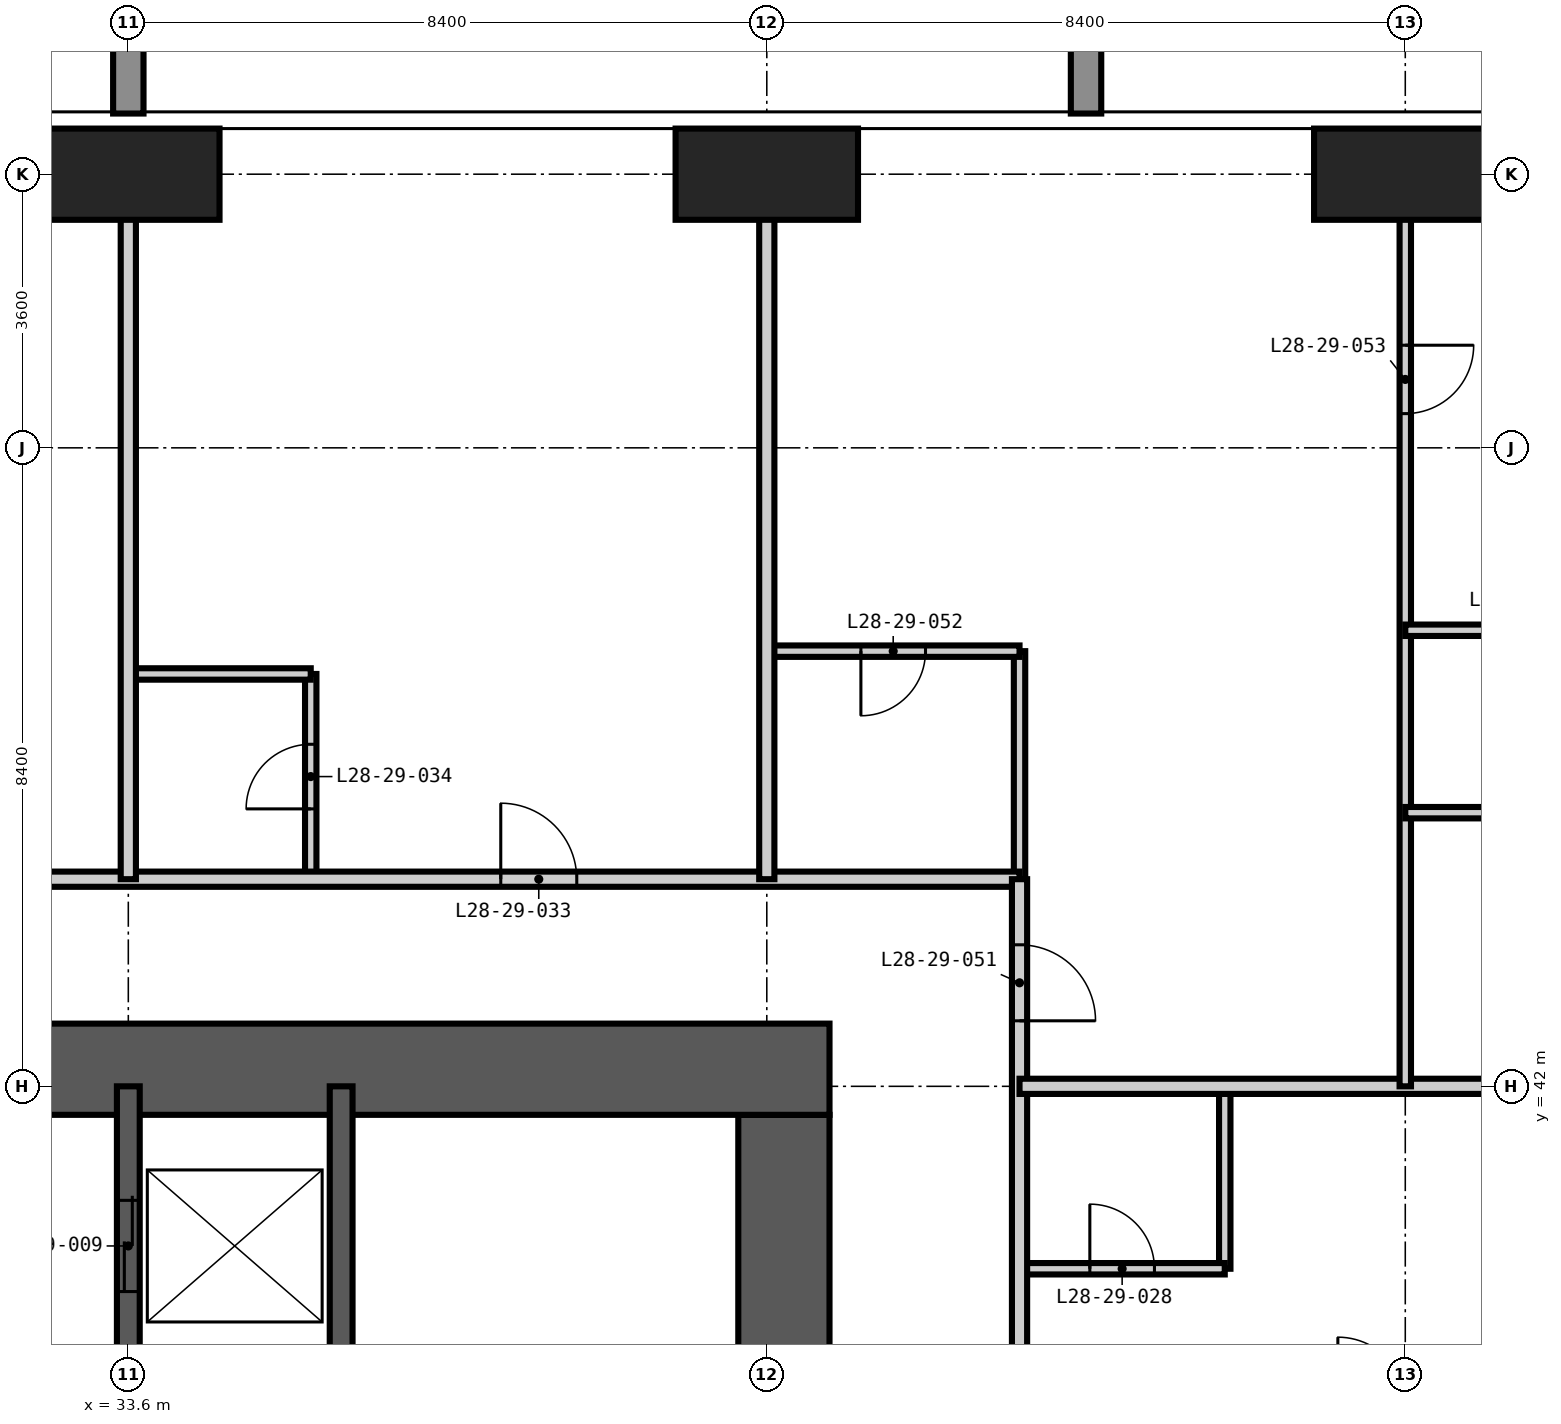
"""IFC4 building model, lengths in metres.
Left out: names, types, materials, properties, quantities, classifications, styles, units other than length and angle.
Written with IfcOpenShell. Run it as: python <this file> out.ifc"""

import sys

from ifc_helpers import new_model, si_unit, direction, frame, frame_2d, origin, origin_2d, place, context, subcontext, project, spatial, rectangle, extrude, element, fill, save


model = new_model("IFC4")
c1 = context("Model", 3, precision=1e-05, world=origin(), true_north=direction((0.0, 1.0)))
c2 = subcontext(c1, "Body", "Model", "MODEL_VIEW")
j1 = project(units=[si_unit("LENGTHUNIT", "METRE"), si_unit("PLANEANGLEUNIT", "RADIAN")], contexts=[c1])
p1 = place(None, origin())
s1 = spatial("IfcSite", under=j1, at=p1, CompositionType="ELEMENT")
p2 = place(p1, origin())
s2 = spatial("IfcBuilding", under=s1, at=p2, CompositionType="ELEMENT")
p3 = place(p2, frame((0.0, 0.0, 111.6)))
s3 = spatial("IfcBuildingStorey", under=s2, at=p3, CompositionType="ELEMENT", Elevation=111.6)
for number, where, z_axis, x_axis in (
    (1, (33.6, 54.0, -0.35), (0.0, 0.0, 1.0), (1.0, 0.0, 0.0)),
    (2, (42.0, 54.0, -0.35), (0.0, 0.0, 1.0), (1.0, 0.0, 0.0)),
    (3, (50.4, 54.0, -0.35), (0.0, 0.0, 1.0), (1.0, 0.0, 0.0)),
):
    element("IfcColumn", number, at=place(p3, frame(where, z_axis=z_axis, x_axis=x_axis)), inside=s3, PredefinedType="COLUMN", context=c2, shape_type="SweptSolid", body=[
        extrude(rectangle(XDim=2.4, YDim=1.2, at=origin_2d()), origin(), (0.0, 0.0, 1.0), 3.6),
    ])
p4 = place(p3, frame((42.225, 17.175, -0.35), z_axis=(0.0, 0.0, 1.0), x_axis=(0.0, 1.0, 0.0)))
e4 = element("IfcWall", 4, at=p4, inside=s3, PredefinedType="SHEAR", context=c2, shape_type="SweptSolid", body=[
    extrude(rectangle(XDim=24.45, YDim=1.2, at=frame_2d((12.225, 0.0))), origin(), (0.0, 0.0, 1.0), 3.6),
])
p5 = place(p4, frame((0.425, 0.0, 0.35)))
e5 = element("IfcOpeningElement", 5, at=p5, cuts=e4, PredefinedType="OPENING", context=c2, shape_type="SweptSolid", body=[
    extrude(rectangle(XDim=1.2, YDim=2.2, at=frame_2d((0.6, 1.1))), frame((0.0, 0.61, 0.0), z_axis=(0.0, -1.0, 0.0), x_axis=(1.0, 0.0, 0.0)), (0.0, 0.0, 1.0), 1.22),
])
p6 = place(p4, frame((11.325, 0.0, 0.35)))
e6 = element("IfcOpeningElement", 6, at=p6, cuts=e4, PredefinedType="OPENING", context=c2, shape_type="SweptSolid", body=[
    extrude(rectangle(XDim=1.8, YDim=2.2, at=frame_2d((0.9, 1.1))), frame((0.0, 0.61, 0.0), z_axis=(0.0, -1.0, 0.0), x_axis=(1.0, 0.0, 0.0)), (0.0, 0.0, 1.0), 1.22),
])
p7 = place(p4, frame((20.125, 0.0, 0.35)))
e7 = element("IfcOpeningElement", 7, at=p7, cuts=e4, PredefinedType="OPENING", context=c2, shape_type="SweptSolid", body=[
    extrude(rectangle(XDim=1.0, YDim=2.1, at=frame_2d((0.5, 1.05))), frame((0.0, 0.61, 0.0), z_axis=(0.0, -1.0, 0.0), x_axis=(1.0, 0.0, 0.0)), (0.0, 0.0, 1.0), 1.22),
])
p8 = place(p3, frame((42.825, 42.225, -0.35), z_axis=(0.0, 0.0, 1.0), x_axis=(-1.0, 0.0, 0.0)))
e8 = element("IfcWall", 8, at=p8, inside=s3, PredefinedType="SHEAR", context=c2, shape_type="SweptSolid", body=[
    extrude(rectangle(XDim=26.85, YDim=1.2, at=frame_2d((13.425, 0.0))), origin(), (0.0, 0.0, 1.0), 3.6),
])
p9 = place(p8, frame((21.325, 0.0, 0.35)))
e9 = element("IfcOpeningElement", 9, at=p9, cuts=e8, PredefinedType="OPENING", context=c2, shape_type="SweptSolid", body=[
    extrude(rectangle(XDim=1.0, YDim=2.1, at=frame_2d((0.5, 1.05))), frame((0.0, 0.61, 0.0), z_axis=(0.0, -1.0, 0.0), x_axis=(1.0, 0.0, 0.0)), (0.0, 0.0, 1.0), 1.22),
])
p10 = place(p8, frame((10.725, 0.0, 0.35)))
e10 = element("IfcOpeningElement", 10, at=p10, cuts=e8, PredefinedType="OPENING", context=c2, shape_type="SweptSolid", body=[
    extrude(rectangle(XDim=1.2, YDim=2.2, at=frame_2d((0.6, 1.1))), frame((0.0, 0.61, 0.0), z_axis=(0.0, -1.0, 0.0), x_axis=(1.0, 0.0, 0.0)), (0.0, 0.0, 1.0), 1.22),
])
p11 = place(p3, frame((33.6, 16.8, -0.35), z_axis=(0.0, 0.0, 1.0), x_axis=(0.0, 1.0, 0.0)))
e11 = element("IfcWall", 11, at=p11, inside=s3, PredefinedType="SHEAR", context=c2, shape_type="SweptSolid", body=[
    extrude(rectangle(XDim=25.2, YDim=0.3, at=frame_2d((12.6, 0.0))), origin(), (0.0, 0.0, 1.0), 3.6),
])
p12 = place(p11, frame((22.5, 0.0, 0.35)))
e12 = element("IfcOpeningElement", 12, at=p12, cuts=e11, PredefinedType="OPENING", context=c2, shape_type="SweptSolid", body=[
    extrude(rectangle(XDim=1.2, YDim=2.2, at=frame_2d((0.6, 1.1))), frame((0.0, 0.16, 0.0), z_axis=(0.0, -1.0, 0.0), x_axis=(1.0, 0.0, 0.0)), (0.0, 0.0, 1.0), 0.32),
])
p13 = place(p11, frame((18.3, 0.0, 0.35)))
e13 = element("IfcOpeningElement", 13, at=p13, cuts=e11, PredefinedType="OPENING", context=c2, shape_type="SweptSolid", body=[
    extrude(rectangle(XDim=1.2, YDim=2.2, at=frame_2d((0.6, 1.1))), frame((0.0, 0.16, 0.0), z_axis=(0.0, -1.0, 0.0), x_axis=(1.0, 0.0, 0.0)), (0.0, 0.0, 1.0), 0.32),
])
p14 = place(p3, frame((36.4, 33.6, -0.35), z_axis=(0.0, 0.0, 1.0), x_axis=(0.0, 1.0, 0.0)))
e14 = element("IfcWall", 14, at=p14, inside=s3, PredefinedType="SHEAR", context=c2, shape_type="SweptSolid", body=[
    extrude(rectangle(XDim=8.4, YDim=0.3, at=frame_2d((4.2, 0.0))), origin(), (0.0, 0.0, 1.0), 3.6),
])
p15 = place(p3, frame((36.0, 44.725, 0.0), z_axis=(0.0, 0.0, 1.0), x_axis=(0.0, 1.0, 0.0)))
e15 = element("IfcWall", 15, at=p15, inside=s3, PredefinedType="PARTITIONING", context=c2, shape_type="SweptSolid", body=[
    extrude(rectangle(XDim=2.7, YDim=0.15, at=frame_2d((1.35, 0.0))), origin(), (0.0, 0.0, 1.0), 3.25),
])
p16 = place(p15, frame((0.925, 0.0, 0.0)))
e16 = element("IfcOpeningElement", 16, at=p16, cuts=e15, PredefinedType="OPENING", context=c2, shape_type="SweptSolid", body=[
    extrude(rectangle(XDim=0.85, YDim=2.1, at=frame_2d((0.425, 1.05))), frame((0.0, 0.085, 0.0), z_axis=(0.0, -1.0, 0.0), x_axis=(1.0, 0.0, 0.0)), (0.0, 0.0, 1.0), 0.17),
])
p17 = place(p3, frame((45.325, 44.725, 0.0), z_axis=(0.0, 0.0, 1.0), x_axis=(0.0, 1.0, 0.0)))
e17 = element("IfcWall", 17, at=p17, inside=s3, PredefinedType="PARTITIONING", context=c2, shape_type="SweptSolid", body=[
    extrude(rectangle(XDim=3.0, YDim=0.15, at=frame_2d((1.5, 0.0))), origin(), (0.0, 0.0, 1.0), 3.25),
])
p18 = place(p3, frame((48.025, 39.6, 0.0), z_axis=(0.0, 0.0, 1.0), x_axis=(0.0, 1.0, 0.0)))
e18 = element("IfcWall", 18, at=p18, inside=s3, PredefinedType="PARTITIONING", context=c2, shape_type="SweptSolid", body=[
    extrude(rectangle(XDim=2.4, YDim=0.15, at=frame_2d((1.2, 0.0))), origin(), (0.0, 0.0, 1.0), 3.25),
])
p19 = place(p3, frame((45.325, 39.6, 0.0), z_axis=(0.0, 0.0, 1.0), x_axis=(1.0, 0.0, 0.0)))
e19 = element("IfcWall", 19, at=p19, inside=s3, PredefinedType="PARTITIONING", context=c2, shape_type="SweptSolid", body=[
    extrude(rectangle(XDim=2.7, YDim=0.15, at=frame_2d((1.35, 0.0))), origin(), (0.0, 0.0, 1.0), 3.25),
])
p20 = place(p19, frame((0.925, 0.0, 0.0)))
e20 = element("IfcOpeningElement", 20, at=p20, cuts=e19, PredefinedType="OPENING", context=c2, shape_type="SweptSolid", body=[
    extrude(rectangle(XDim=0.85, YDim=2.1, at=frame_2d((0.425, 1.05))), frame((0.0, 0.085, 0.0), z_axis=(0.0, -1.0, 0.0), x_axis=(1.0, 0.0, 0.0)), (0.0, 0.0, 1.0), 0.17),
])
p21 = place(p3, frame((33.6, 47.425, 0.0), z_axis=(0.0, 0.0, 1.0), x_axis=(1.0, 0.0, 0.0)))
e21 = element("IfcWall", 21, at=p21, inside=s3, PredefinedType="PARTITIONING", context=c2, shape_type="SweptSolid", body=[
    extrude(rectangle(XDim=2.4, YDim=0.15, at=frame_2d((1.2, 0.0))), origin(), (0.0, 0.0, 1.0), 3.25),
])
p22 = place(p3, frame((42.0, 47.725, 0.0), z_axis=(0.0, 0.0, 1.0), x_axis=(1.0, 0.0, 0.0)))
e22 = element("IfcWall", 22, at=p22, inside=s3, PredefinedType="PARTITIONING", context=c2, shape_type="SweptSolid", body=[
    extrude(rectangle(XDim=3.325, YDim=0.15, at=frame_2d((1.663, 0.0))), origin(), (0.0, 0.0, 1.0), 3.25),
])
p23 = place(p22, frame((1.238, 0.0, 0.0)))
e23 = element("IfcOpeningElement", 23, at=p23, cuts=e22, PredefinedType="OPENING", context=c2, shape_type="SweptSolid", body=[
    extrude(rectangle(XDim=0.85, YDim=2.1, at=frame_2d((0.425, 1.05))), frame((0.0, 0.085, 0.0), z_axis=(0.0, -1.0, 0.0), x_axis=(1.0, 0.0, 0.0)), (0.0, 0.0, 1.0), 0.17),
])
p24 = place(p3, frame((12.6, 44.725, 0.0), z_axis=(0.0, 0.0, 1.0), x_axis=(1.0, 0.0, 0.0)))
e24 = element("IfcWall", 24, at=p24, inside=s3, PredefinedType="PARTITIONING", context=c2, shape_type="SweptSolid", body=[
    extrude(rectangle(XDim=32.725, YDim=0.2, at=frame_2d((16.362, 0.0))), origin(), (0.0, 0.0, 1.0), 3.25),
])
p25 = place(p24, frame((9.1, 0.0, 0.0)))
e25 = element("IfcOpeningElement", 25, at=p25, cuts=e24, PredefinedType="OPENING", context=c2, shape_type="SweptSolid", body=[
    extrude(rectangle(XDim=1.0, YDim=2.2, at=frame_2d((0.5, 1.1))), frame((0.0, 0.11, 0.0), z_axis=(0.0, -1.0, 0.0), x_axis=(1.0, 0.0, 0.0)), (0.0, 0.0, 1.0), 0.22),
])
p26 = place(p24, frame((17.5, 0.0, 0.0)))
e26 = element("IfcOpeningElement", 26, at=p26, cuts=e24, PredefinedType="OPENING", context=c2, shape_type="SweptSolid", body=[
    extrude(rectangle(XDim=1.0, YDim=2.2, at=frame_2d((0.5, 1.1))), frame((0.0, 0.11, 0.0), z_axis=(0.0, -1.0, 0.0), x_axis=(1.0, 0.0, 0.0)), (0.0, 0.0, 1.0), 0.22),
])
p27 = place(p24, frame((25.9, 0.0, 0.0)))
e27 = element("IfcOpeningElement", 27, at=p27, cuts=e24, PredefinedType="OPENING", context=c2, shape_type="SweptSolid", body=[
    extrude(rectangle(XDim=1.0, YDim=2.2, at=frame_2d((0.5, 1.1))), frame((0.0, 0.11, 0.0), z_axis=(0.0, -1.0, 0.0), x_axis=(1.0, 0.0, 0.0)), (0.0, 0.0, 1.0), 0.22),
])
p28 = place(p3, frame((45.325, 44.725, 0.0), z_axis=(0.0, 0.0, 1.0), x_axis=(0.0, -1.0, 0.0)))
e28 = element("IfcWall", 28, at=p28, inside=s3, PredefinedType="PARTITIONING", context=c2, shape_type="SweptSolid", body=[
    extrude(rectangle(XDim=31.85, YDim=0.2, at=frame_2d((15.925, 0.0))), origin(), (0.0, 0.0, 1.0), 3.25),
])
p29 = place(p28, frame((24.425, 0.0, 0.0)))
e29 = element("IfcOpeningElement", 29, at=p29, cuts=e28, PredefinedType="OPENING", context=c2, shape_type="SweptSolid", body=[
    extrude(rectangle(XDim=1.0, YDim=2.2, at=frame_2d((0.5, 1.1))), frame((0.0, 0.11, 0.0), z_axis=(0.0, -1.0, 0.0), x_axis=(1.0, 0.0, 0.0)), (0.0, 0.0, 1.0), 0.22),
])
p30 = place(p28, frame((16.025, 0.0, 0.0)))
e30 = element("IfcOpeningElement", 30, at=p30, cuts=e28, PredefinedType="OPENING", context=c2, shape_type="SweptSolid", body=[
    extrude(rectangle(XDim=1.0, YDim=2.2, at=frame_2d((0.5, 1.1))), frame((0.0, 0.11, 0.0), z_axis=(0.0, -1.0, 0.0), x_axis=(1.0, 0.0, 0.0)), (0.0, 0.0, 1.0), 0.22),
])
p31 = place(p28, frame((7.625, 0.0, 0.0)))
e31 = element("IfcOpeningElement", 31, at=p31, cuts=e28, PredefinedType="OPENING", context=c2, shape_type="SweptSolid", body=[
    extrude(rectangle(XDim=1.0, YDim=2.2, at=frame_2d((0.5, 1.1))), frame((0.0, 0.11, 0.0), z_axis=(0.0, -1.0, 0.0), x_axis=(1.0, 0.0, 0.0)), (0.0, 0.0, 1.0), 0.22),
])
p32 = place(p28, frame((29.387, 0.0, 0.0)))
e32 = element("IfcOpeningElement", 32, at=p32, cuts=e28, PredefinedType="OPENING", context=c2, shape_type="SweptSolid", body=[
    extrude(rectangle(XDim=1.0, YDim=2.2, at=frame_2d((0.5, 1.1))), frame((0.0, 0.11, 0.0), z_axis=(0.0, -1.0, 0.0), x_axis=(1.0, 0.0, 0.0)), (0.0, 0.0, 1.0), 0.22),
])
p33 = place(p28, frame((0.863, 0.0, 0.0)))
e33 = element("IfcOpeningElement", 33, at=p33, cuts=e28, PredefinedType="OPENING", context=c2, shape_type="SweptSolid", body=[
    extrude(rectangle(XDim=1.0, YDim=2.2, at=frame_2d((0.5, 1.1))), frame((0.0, 0.11, 0.0), z_axis=(0.0, -1.0, 0.0), x_axis=(1.0, 0.0, 0.0)), (0.0, 0.0, 1.0), 0.22),
])
for number, where, z_axis, x_axis in (
    (34, (33.6, 44.725, 0.0), (0.0, 0.0, 1.0), (0.0, 1.0, 0.0)),
    (35, (42.0, 44.725, 0.0), (0.0, 0.0, 1.0), (0.0, 1.0, 0.0)),
):
    element("IfcWall", number, at=place(p3, frame(where, z_axis=z_axis, x_axis=x_axis)), inside=s3, PredefinedType="PARTITIONING", context=c2, shape_type="SweptSolid", body=[
        extrude(rectangle(XDim=9.893, YDim=0.2, at=frame_2d((4.946, 0.0))), origin(), (0.0, 0.0, 1.0), 3.25),
    ])
p34 = place(p3, frame((45.325, 42.0, 0.0), z_axis=(0.0, 0.0, 1.0), x_axis=(1.0, 0.0, 0.0)))
e36 = element("IfcWall", 36, at=p34, inside=s3, PredefinedType="PARTITIONING", context=c2, shape_type="SweptSolid", body=[
    extrude(rectangle(XDim=9.293, YDim=0.2, at=frame_2d((4.646, 0.0))), origin(), (0.0, 0.0, 1.0), 3.25),
])
p35 = place(p3, frame((50.4, 42.0, 0.0), z_axis=(0.0, 0.0, 1.0), x_axis=(0.0, 1.0, 0.0)))
e37 = element("IfcWall", 37, at=p35, inside=s3, PredefinedType="PARTITIONING", context=c2, shape_type="SweptSolid", body=[
    extrude(rectangle(XDim=12.618, YDim=0.15, at=frame_2d((6.309, 0.0))), origin(), (0.0, 0.0, 1.0), 3.25),
])
p36 = place(p35, frame((8.85, 0.0, 0.0)))
e38 = element("IfcOpeningElement", 38, at=p36, cuts=e37, PredefinedType="OPENING", context=c2, shape_type="SweptSolid", body=[
    extrude(rectangle(XDim=0.9, YDim=2.1, at=frame_2d((0.45, 1.05))), frame((0.0, 0.085, 0.0), z_axis=(0.0, -1.0, 0.0), x_axis=(1.0, 0.0, 0.0)), (0.0, 0.0, 1.0), 0.17),
])
p37 = place(p3, frame((50.4, 45.6, 0.0), z_axis=(0.0, 0.0, 1.0), x_axis=(1.0, 0.0, 0.0)))
e39 = element("IfcWall", 39, at=p37, inside=s3, PredefinedType="PARTITIONING", context=c2, shape_type="SweptSolid", body=[
    extrude(rectangle(XDim=3.0, YDim=0.15, at=frame_2d((1.5, 0.0))), origin(), (0.0, 0.0, 1.0), 3.25),
])
p38 = place(p3, frame((50.4, 48.0, 0.0), z_axis=(0.0, 0.0, 1.0), x_axis=(1.0, 0.0, 0.0)))
e40 = element("IfcWall", 40, at=p38, inside=s3, PredefinedType="PARTITIONING", context=c2, shape_type="SweptSolid", body=[
    extrude(rectangle(XDim=3.0, YDim=0.15, at=frame_2d((1.5, 0.0))), origin(), (0.0, 0.0, 1.0), 3.25),
])
p39 = place(p38, frame((1.05, 0.0, 0.0)))
e41 = element("IfcOpeningElement", 41, at=p39, cuts=e40, PredefinedType="OPENING", context=c2, shape_type="SweptSolid", body=[
    extrude(rectangle(XDim=0.9, YDim=2.1, at=frame_2d((0.45, 1.05))), frame((0.0, 0.085, 0.0), z_axis=(0.0, -1.0, 0.0), x_axis=(1.0, 0.0, 0.0)), (0.0, 0.0, 1.0), 0.17),
])
p40 = place(p12, origin())
e42 = element("IfcDoor", 42, at=p40, inside=s3, OperationType="DOUBLE_DOOR_SLIDING", PredefinedType="DOOR", context=c2, shape_type="SweptSolid", body=[
    extrude(rectangle(XDim=1.2, YDim=2.2, at=frame_2d((0.6, 1.1))), frame((0.0, 0.025, 0.0), z_axis=(0.0, -1.0, 0.0), x_axis=(1.0, 0.0, 0.0)), (0.0, 0.0, 1.0), 0.05),
])
fill(e12, e42)
p41 = place(p20, origin())
e43 = element("IfcDoor", 43, at=p41, inside=s3, OperationType="SINGLE_SWING_LEFT", PredefinedType="DOOR", context=c2, shape_type="SweptSolid", body=[
    extrude(rectangle(XDim=0.85, YDim=2.1, at=frame_2d((0.425, 1.05))), frame((0.0, 0.025, 0.0), z_axis=(0.0, -1.0, 0.0), x_axis=(1.0, 0.0, 0.0)), (0.0, 0.0, 1.0), 0.05),
])
fill(e20, e43)
p42 = place(p27, origin())
e44 = element("IfcDoor", 44, at=p42, inside=s3, OperationType="SINGLE_SWING_LEFT", PredefinedType="DOOR", context=c2, shape_type="SweptSolid", body=[
    extrude(rectangle(XDim=1.0, YDim=2.2, at=frame_2d((0.5, 1.1))), frame((0.0, 0.025, 0.0), z_axis=(0.0, -1.0, 0.0), x_axis=(1.0, 0.0, 0.0)), (0.0, 0.0, 1.0), 0.05),
])
fill(e27, e44)
p43 = place(p16, origin())
e45 = element("IfcDoor", 45, at=p43, inside=s3, OperationType="SINGLE_SWING_LEFT", PredefinedType="DOOR", context=c2, shape_type="SweptSolid", body=[
    extrude(rectangle(XDim=0.85, YDim=2.1, at=frame_2d((0.425, 1.05))), frame((0.0, 0.025, 0.0), z_axis=(0.0, -1.0, 0.0), x_axis=(1.0, 0.0, 0.0)), (0.0, 0.0, 1.0), 0.05),
])
fill(e16, e45)
p44 = place(p33, origin())
e46 = element("IfcDoor", 46, at=p44, inside=s3, OperationType="SINGLE_SWING_RIGHT", PredefinedType="DOOR", context=c2, shape_type="SweptSolid", body=[
    extrude(rectangle(XDim=1.0, YDim=2.2, at=frame_2d((0.5, 1.1))), frame((0.0, 0.025, 0.0), z_axis=(0.0, -1.0, 0.0), x_axis=(1.0, 0.0, 0.0)), (0.0, 0.0, 1.0), 0.05),
])
fill(e33, e46)
p45 = place(p23, frame((0.85, 0.0, 0.0), z_axis=(0.0, 0.0, 1.0), x_axis=(-1.0, 0.0, 0.0)))
e47 = element("IfcDoor", 47, at=p45, inside=s3, OperationType="SINGLE_SWING_RIGHT", PredefinedType="DOOR", context=c2, shape_type="SweptSolid", body=[
    extrude(rectangle(XDim=0.85, YDim=2.1, at=frame_2d((0.425, 1.05))), frame((0.0, 0.025, 0.0), z_axis=(0.0, -1.0, 0.0), x_axis=(1.0, 0.0, 0.0)), (0.0, 0.0, 1.0), 0.05),
])
fill(e23, e47)
p46 = place(p36, frame((0.9, 0.0, 0.0), z_axis=(0.0, 0.0, 1.0), x_axis=(-1.0, 0.0, 0.0)))
e48 = element("IfcDoor", 48, at=p46, inside=s3, OperationType="SINGLE_SWING_LEFT", PredefinedType="DOOR", context=c2, shape_type="SweptSolid", body=[
    extrude(rectangle(XDim=0.9, YDim=2.1, at=frame_2d((0.45, 1.05))), frame((0.0, 0.025, 0.0), z_axis=(0.0, -1.0, 0.0), x_axis=(1.0, 0.0, 0.0)), (0.0, 0.0, 1.0), 0.05),
])
fill(e38, e48)
save(model, sys.argv[1])
